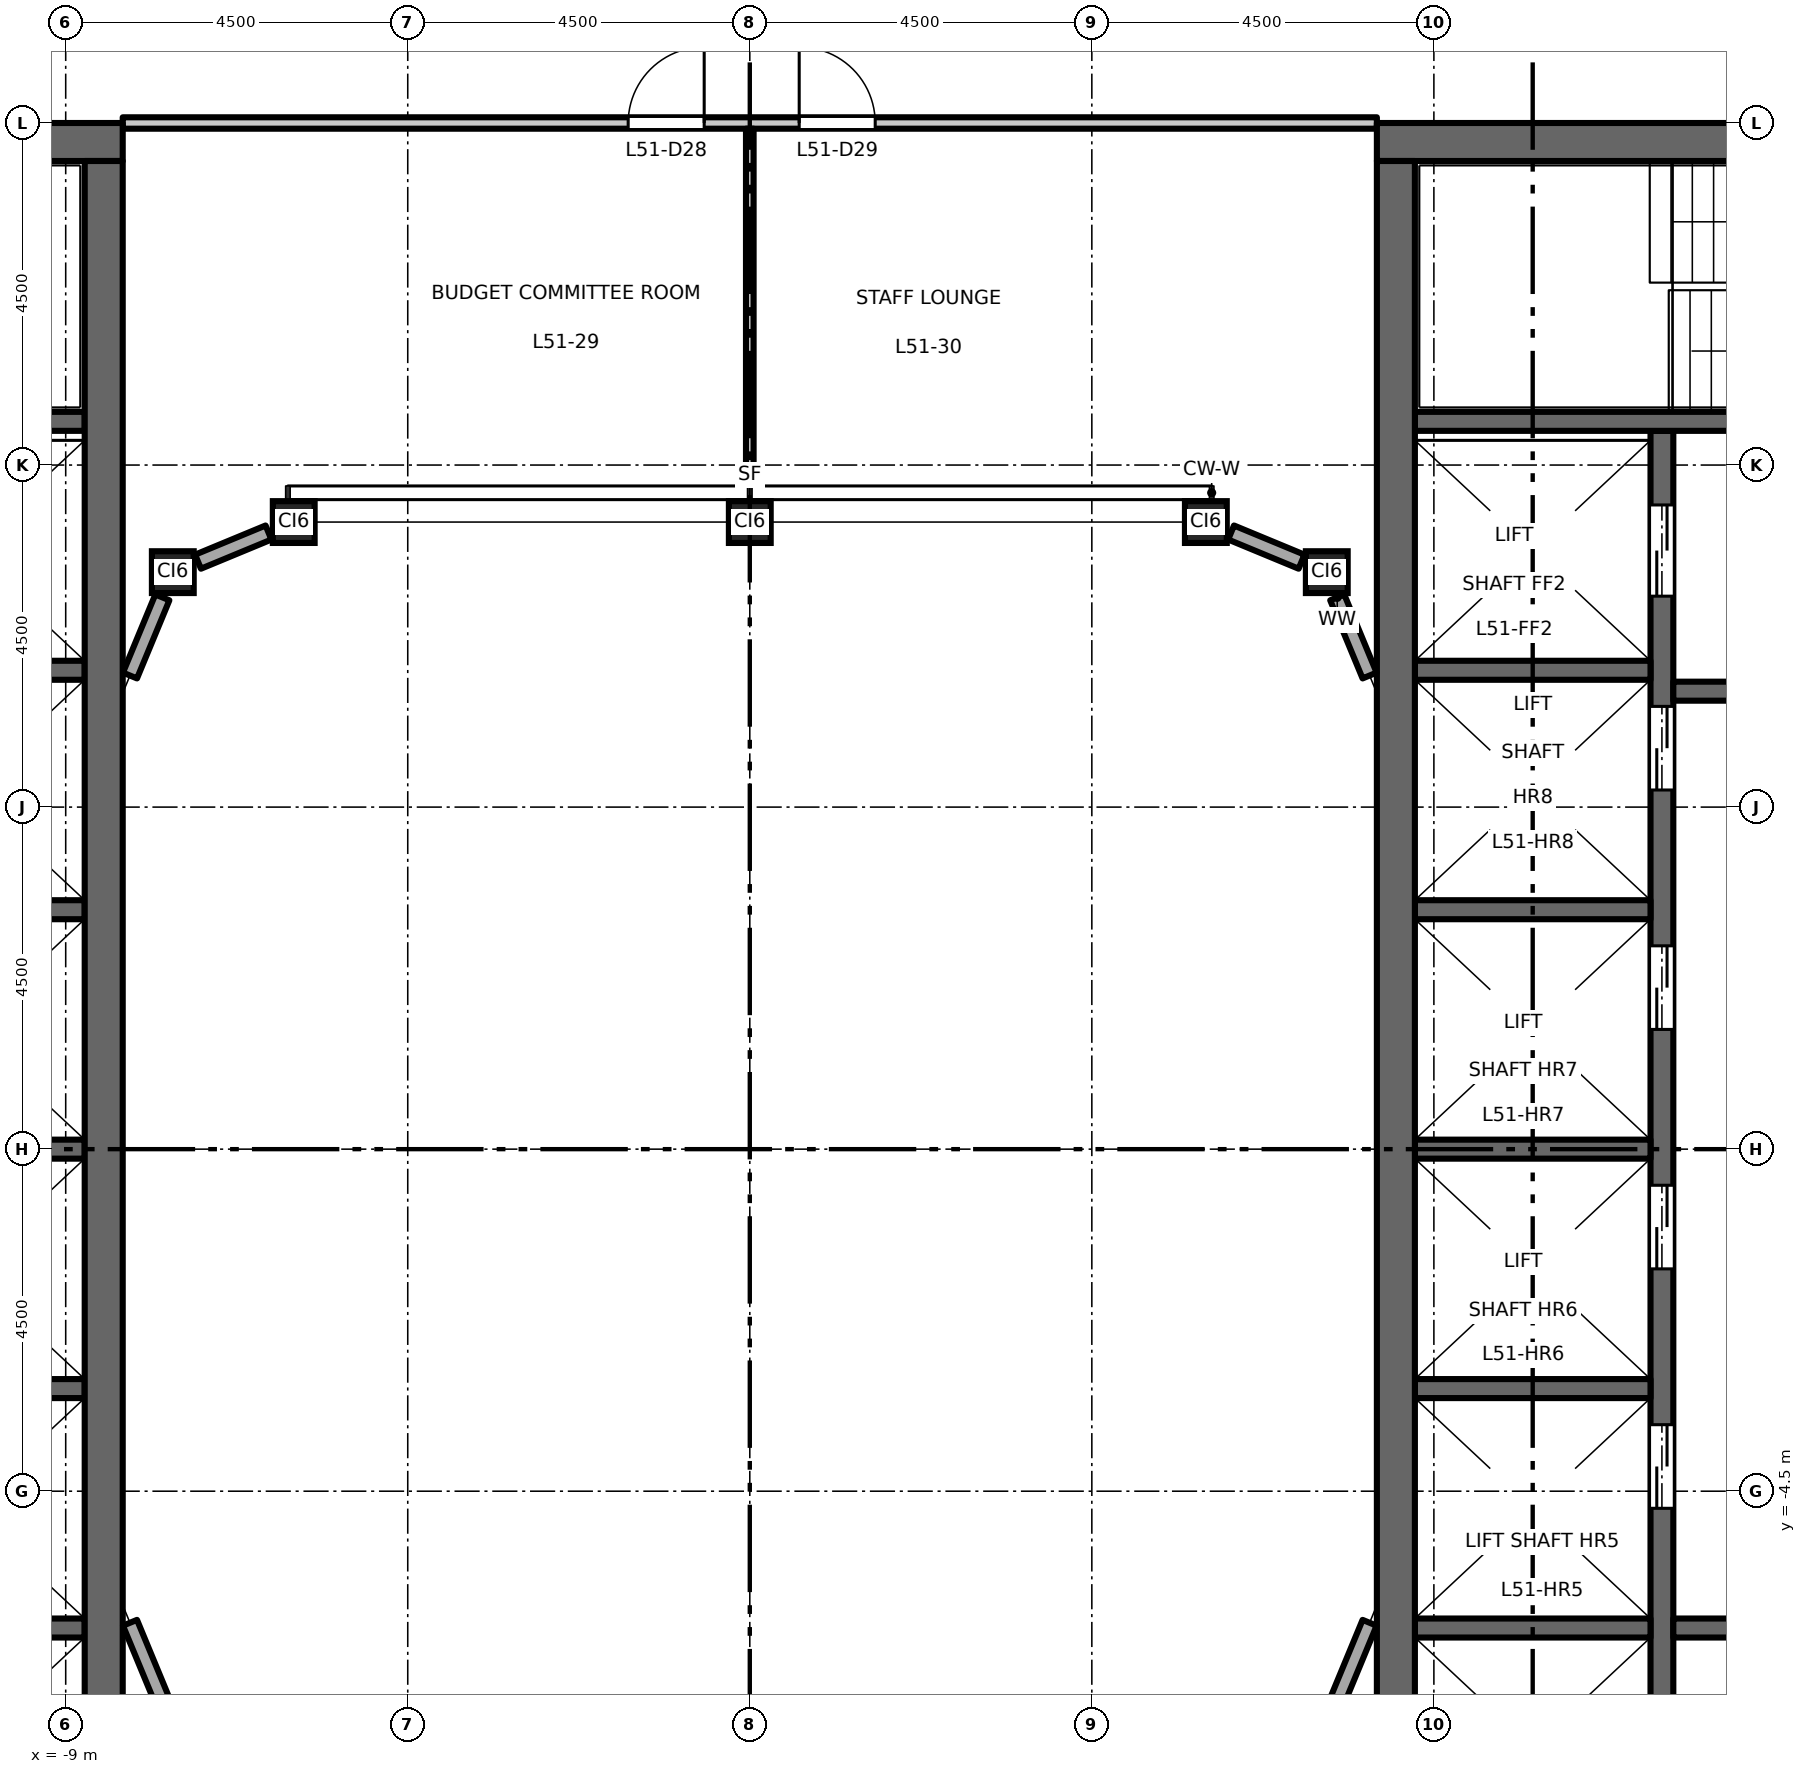
"""IFC4 building model, lengths in metres.
Left out: names, types, materials, properties, quantities, classifications, styles, units other than length and angle.
Written with IfcOpenShell. Run it as: python <this file> out.ifc"""

import sys

from ifc_helpers import new_model, si_unit, direction, frame, frame_2d, origin, origin_2d, place, context, subcontext, project, spatial, rectangle, hollow_rectangle, extrude, element, fill, save


model = new_model("IFC4")
c1 = context("Model", 3, precision=1e-05, world=origin(), true_north=direction((0.0, 1.0)))
c2 = subcontext(c1, "Body", "Model", "MODEL_VIEW")
j1 = project(units=[si_unit("LENGTHUNIT", "METRE"), si_unit("PLANEANGLEUNIT", "RADIAN")], contexts=[c1])
p1 = place(None, origin())
s1 = spatial("IfcSite", under=j1, at=p1, CompositionType="ELEMENT")
p2 = place(p1, origin())
s2 = spatial("IfcBuilding", under=s1, at=p2, CompositionType="ELEMENT")
p3 = place(p2, frame((0.0, 0.0, 237.7)))
s3 = spatial("IfcBuildingStorey", under=s2, at=p3, CompositionType="ELEMENT", Elevation=237.7)
for number, where, z_axis, x_axis in (
    (1, (-7.591, 7.591, 0.0), (0.0, 0.0, 1.0), (1.0, 0.0, 0.0)),
    (2, (-6.0, 8.25, 0.0), (0.0, 0.0, 1.0), (1.0, 0.0, 0.0)),
    (3, (0.0, 8.25, 0.0), (0.0, 0.0, 1.0), (1.0, 0.0, 0.0)),
    (4, (6.0, 8.25, 0.0), (0.0, 0.0, 1.0), (1.0, 0.0, 0.0)),
    (5, (7.591, 7.591, 0.0), (0.0, 0.0, 1.0), (1.0, 0.0, 0.0)),
):
    element("IfcColumn", number, at=place(p3, frame(where, z_axis=z_axis, x_axis=x_axis)), inside=s3, PredefinedType="COLUMN", context=c2, shape_type="SweptSolid", body=[
        extrude(hollow_rectangle(XDim=0.55, YDim=0.55, WallThickness=0.028, at=origin_2d()), origin(), (0.0, 0.0, 1.0), 4.5),
    ])
for number, where, z_axis, x_axis in (
    (6, (-8.75, 0.0, 0.0), (0.0, 0.0, 1.0), (-1.0, 0.0, 0.0)),
    (7, (-8.75, 3.15, 0.0), (0.0, 0.0, 1.0), (-1.0, 0.0, 0.0)),
    (8, (-8.75, 6.3, 0.0), (0.0, 0.0, 1.0), (-1.0, 0.0, 0.0)),
    (9, (-8.75, -3.15, 0.0), (0.0, 0.0, 1.0), (-1.0, 0.0, 0.0)),
    (10, (-8.75, -6.3, 0.0), (0.0, 0.0, 1.0), (-1.0, 0.0, 0.0)),
):
    element("IfcWall", number, at=place(p3, frame(where, z_axis=z_axis, x_axis=x_axis)), inside=s3, PredefinedType="SHEAR", context=c2, shape_type="SweptSolid", body=[
        extrude(rectangle(XDim=3.1, YDim=0.25, at=frame_2d((1.55, 0.0))), origin(), (0.0, 0.0, 1.0), 4.35),
    ])
p4 = place(p3, frame((-8.75, 9.575, 0.0), z_axis=(0.0, 0.0, 1.0), x_axis=(-1.0, 0.0, 0.0)))
e11 = element("IfcWall", 11, at=p4, inside=s3, PredefinedType="SHEAR", context=c2, shape_type="SweptSolid", body=[
    extrude(rectangle(XDim=8.0, YDim=0.25, at=frame_2d((4.0, 0.0))), origin(), (0.0, 0.0, 1.0), 4.35),
])
p5 = place(p4, frame((6.65, 0.0, 0.0)))
e12 = element("IfcOpeningElement", 12, at=p5, cuts=e11, PredefinedType="OPENING", context=c2, shape_type="SweptSolid", body=[
    extrude(rectangle(XDim=1.1, YDim=2.1, at=frame_2d((0.55, 1.05))), frame((0.0, 0.135, 0.0), z_axis=(0.0, -1.0, 0.0), x_axis=(1.0, 0.0, 0.0)), (0.0, 0.0, 1.0), 0.27),
])
p6 = place(p3, frame((-8.25, 13.25, 0.0), z_axis=(0.0, 0.0, 1.0), x_axis=(-1.0, 0.0, 0.0)))
e13 = element("IfcWall", 13, at=p6, inside=s3, PredefinedType="SHEAR", context=c2, shape_type="SweptSolid", body=[
    extrude(rectangle(XDim=13.5, YDim=0.5, at=frame_2d((6.75, 0.0))), origin(), (0.0, 0.0, 1.0), 4.35),
])
p7 = place(p3, frame((-8.5, -13.0, 0.0), z_axis=(0.0, 0.0, 1.0), x_axis=(0.0, 1.0, 0.0)))
e14 = element("IfcWall", 14, at=p7, inside=s3, PredefinedType="SHEAR", context=c2, shape_type="SweptSolid", body=[
    extrude(rectangle(XDim=26.0, YDim=0.5, at=frame_2d((13.0, 0.0))), origin(), (0.0, 0.0, 1.0), 4.35),
])
p8 = place(p3, frame((12.0, -9.45, 0.0), z_axis=(0.0, 0.0, 1.0), x_axis=(0.0, 1.0, 0.0)))
e15 = element("IfcWall", 15, at=p8, inside=s3, PredefinedType="SHEAR", context=c2, shape_type="SweptSolid", body=[
    extrude(rectangle(XDim=18.9, YDim=0.3, at=frame_2d((9.45, 0.0))), origin(), (0.0, 0.0, 1.0), 4.35),
])
p9 = place(p8, frame((4.725, 0.0, 0.0)))
e16 = element("IfcOpeningElement", 16, at=p9, cuts=e15, PredefinedType="OPENING", context=c2, shape_type="SweptSolid", body=[
    extrude(rectangle(XDim=1.1, YDim=2.1, at=frame_2d((0.55, 1.05))), frame((0.0, 0.16, 0.0), z_axis=(0.0, -1.0, 0.0), x_axis=(1.0, 0.0, 0.0)), (0.0, 0.0, 1.0), 0.32),
])
p10 = place(p8, frame((7.875, 0.0, 0.0)))
e17 = element("IfcOpeningElement", 17, at=p10, cuts=e15, PredefinedType="OPENING", context=c2, shape_type="SweptSolid", body=[
    extrude(rectangle(XDim=1.1, YDim=2.1, at=frame_2d((0.55, 1.05))), frame((0.0, 0.16, 0.0), z_axis=(0.0, -1.0, 0.0), x_axis=(1.0, 0.0, 0.0)), (0.0, 0.0, 1.0), 0.32),
])
p11 = place(p8, frame((11.025, 0.0, 0.0)))
e18 = element("IfcOpeningElement", 18, at=p11, cuts=e15, PredefinedType="OPENING", context=c2, shape_type="SweptSolid", body=[
    extrude(rectangle(XDim=1.1, YDim=2.1, at=frame_2d((0.55, 1.05))), frame((0.0, 0.16, 0.0), z_axis=(0.0, -1.0, 0.0), x_axis=(1.0, 0.0, 0.0)), (0.0, 0.0, 1.0), 0.32),
])
p12 = place(p8, frame((14.175, 0.0, 0.0)))
e19 = element("IfcOpeningElement", 19, at=p12, cuts=e15, PredefinedType="OPENING", context=c2, shape_type="SweptSolid", body=[
    extrude(rectangle(XDim=1.1, YDim=2.1, at=frame_2d((0.55, 1.05))), frame((0.0, 0.16, 0.0), z_axis=(0.0, -1.0, 0.0), x_axis=(1.0, 0.0, 0.0)), (0.0, 0.0, 1.0), 0.32),
])
p13 = place(p8, frame((16.725, 0.0, 0.0)))
e20 = element("IfcOpeningElement", 20, at=p13, cuts=e15, PredefinedType="OPENING", context=c2, shape_type="SweptSolid", body=[
    extrude(rectangle(XDim=1.2, YDim=2.1, at=frame_2d((0.6, 1.05))), frame((0.0, 0.16, 0.0), z_axis=(0.0, -1.0, 0.0), x_axis=(1.0, 0.0, 0.0)), (0.0, 0.0, 1.0), 0.32),
])
p14 = place(p8, frame((0.975, 0.0, 0.0)))
e21 = element("IfcOpeningElement", 21, at=p14, cuts=e15, PredefinedType="OPENING", context=c2, shape_type="SweptSolid", body=[
    extrude(rectangle(XDim=1.2, YDim=2.1, at=frame_2d((0.6, 1.05))), frame((0.0, 0.16, 0.0), z_axis=(0.0, -1.0, 0.0), x_axis=(1.0, 0.0, 0.0)), (0.0, 0.0, 1.0), 0.32),
])
p15 = place(p3, frame((12.15, 6.025, 0.0), z_axis=(0.0, 0.0, 1.0), x_axis=(1.0, 0.0, 0.0)))
e22 = element("IfcWall", 22, at=p15, inside=s3, PredefinedType="SHEAR", context=c2, shape_type="SweptSolid", body=[
    extrude(rectangle(XDim=4.6, YDim=0.25, at=frame_2d((2.3, 0.0))), origin(), (0.0, 0.0, 1.0), 4.35),
])
p16 = place(p15, frame((1.8, 0.0, 0.0)))
e23 = element("IfcOpeningElement", 23, at=p16, cuts=e22, PredefinedType="OPENING", context=c2, shape_type="SweptSolid", body=[
    extrude(rectangle(XDim=1.0, YDim=2.1, at=frame_2d((0.5, 1.05))), frame((0.0, 0.135, 0.0), z_axis=(0.0, -1.0, 0.0), x_axis=(1.0, 0.0, 0.0)), (0.0, 0.0, 1.0), 0.27),
])
p17 = place(p3, frame((12.15, -6.3, 0.0), z_axis=(0.0, 0.0, 1.0), x_axis=(1.0, 0.0, 0.0)))
e24 = element("IfcWall", 24, at=p17, inside=s3, PredefinedType="SHEAR", context=c2, shape_type="SweptSolid", body=[
    extrude(rectangle(XDim=9.1, YDim=0.25, at=frame_2d((4.55, 0.0))), origin(), (0.0, 0.0, 1.0), 4.35),
])
p18 = place(p17, frame((1.8, 0.0, 0.0)))
e25 = element("IfcOpeningElement", 25, at=p18, cuts=e24, PredefinedType="OPENING", context=c2, shape_type="SweptSolid", body=[
    extrude(rectangle(XDim=1.0, YDim=2.1, at=frame_2d((0.5, 1.05))), frame((0.0, 0.135, 0.0), z_axis=(0.0, -1.0, 0.0), x_axis=(1.0, 0.0, 0.0)), (0.0, 0.0, 1.0), 0.27),
])
for number, where, z_axis, x_axis in (
    (26, (8.75, 0.0, 0.0), (0.0, 0.0, 1.0), (1.0, 0.0, 0.0)),
    (27, (8.75, 3.15, 0.0), (0.0, 0.0, 1.0), (1.0, 0.0, 0.0)),
    (28, (8.75, 6.3, 0.0), (0.0, 0.0, 1.0), (1.0, 0.0, 0.0)),
    (29, (8.75, -3.15, 0.0), (0.0, 0.0, 1.0), (1.0, 0.0, 0.0)),
    (30, (8.75, -6.3, 0.0), (0.0, 0.0, 1.0), (1.0, 0.0, 0.0)),
):
    element("IfcWall", number, at=place(p3, frame(where, z_axis=z_axis, x_axis=x_axis)), inside=s3, PredefinedType="SHEAR", context=c2, shape_type="SweptSolid", body=[
        extrude(rectangle(XDim=3.1, YDim=0.25, at=frame_2d((1.55, 0.0))), origin(), (0.0, 0.0, 1.0), 4.35),
    ])
p19 = place(p3, frame((8.75, 9.575, 0.0), z_axis=(0.0, 0.0, 1.0), x_axis=(1.0, 0.0, 0.0)))
e31 = element("IfcWall", 31, at=p19, inside=s3, PredefinedType="SHEAR", context=c2, shape_type="SweptSolid", body=[
    extrude(rectangle(XDim=8.0, YDim=0.25, at=frame_2d((4.0, 0.0))), origin(), (0.0, 0.0, 1.0), 4.35),
])
p20 = place(p19, frame((6.65, 0.0, 0.0)))
e32 = element("IfcOpeningElement", 32, at=p20, cuts=e31, PredefinedType="OPENING", context=c2, shape_type="SweptSolid", body=[
    extrude(rectangle(XDim=1.1, YDim=2.1, at=frame_2d((0.55, 1.05))), frame((0.0, 0.135, 0.0), z_axis=(0.0, -1.0, 0.0), x_axis=(1.0, 0.0, 0.0)), (0.0, 0.0, 1.0), 0.27),
])
p21 = place(p3, frame((8.25, 13.25, 0.0), z_axis=(0.0, 0.0, 1.0), x_axis=(1.0, 0.0, 0.0)))
e33 = element("IfcWall", 33, at=p21, inside=s3, PredefinedType="SHEAR", context=c2, shape_type="SweptSolid", body=[
    extrude(rectangle(XDim=13.5, YDim=0.5, at=frame_2d((6.75, 0.0))), origin(), (0.0, 0.0, 1.0), 4.35),
])
p22 = place(p3, frame((8.5, -13.0, 0.0), z_axis=(0.0, 0.0, 1.0), x_axis=(0.0, 1.0, 0.0)))
e34 = element("IfcWall", 34, at=p22, inside=s3, PredefinedType="SHEAR", context=c2, shape_type="SweptSolid", body=[
    extrude(rectangle(XDim=26.0, YDim=0.5, at=frame_2d((13.0, 0.0))), origin(), (0.0, 0.0, 1.0), 4.35),
])
for number, where, z_axis, x_axis in (
    (35, (7.729, -7.259, 0.0), (0.0, 0.0, 1.0), (0.383, 0.924, 0.0)),
    (36, (8.154, 6.231, 0.0), (0.0, 0.0, 1.0), (-0.383, 0.924, 0.0)),
):
    element("IfcWall", number, at=place(p3, frame(where, z_axis=z_axis, x_axis=x_axis)), inside=s3, PredefinedType="STANDARD", context=c2, shape_type="SweptSolid", body=[
        extrude(rectangle(XDim=1.113, YDim=0.2, at=frame_2d((0.556, 0.0))), origin(), (0.0, 0.0, 1.0), 3.918),
    ])
for number, where, z_axis, x_axis in (
    (37, (7.259, 7.729, 0.0), (0.0, 0.0, 1.0), (-0.924, 0.383, 0.0)),
    (38, (-6.332, 8.113, 0.0), (0.0, 0.0, 1.0), (-0.924, -0.383, 0.0)),
):
    element("IfcWall", number, at=place(p3, frame(where, z_axis=z_axis, x_axis=x_axis)), inside=s3, PredefinedType="STANDARD", context=c2, shape_type="SweptSolid", body=[
        extrude(rectangle(XDim=1.003, YDim=0.2, at=frame_2d((0.502, 0.0))), origin(), (0.0, 0.0, 1.0), 3.918),
    ])
for number, where, z_axis, x_axis in (
    (39, (-7.729, 7.259, 0.0), (0.0, 0.0, 1.0), (-0.383, -0.924, 0.0)),
    (40, (-8.154, -6.231, 0.0), (0.0, 0.0, 1.0), (0.383, -0.924, 0.0)),
):
    element("IfcWall", number, at=place(p3, frame(where, z_axis=z_axis, x_axis=x_axis)), inside=s3, PredefinedType="STANDARD", context=c2, shape_type="SweptSolid", body=[
        extrude(rectangle(XDim=1.113, YDim=0.2, at=frame_2d((0.556, 0.0))), origin(), (0.0, 0.0, 1.0), 3.918),
    ])
p23 = place(p3, frame((-8.25, 13.5, 0.0), z_axis=(0.0, 0.0, 1.0), x_axis=(1.0, 0.0, 0.0)))
e41 = element("IfcWall", 41, at=p23, inside=s3, PredefinedType="PARTITIONING", context=c2, shape_type="SweptSolid", body=[
    extrude(rectangle(XDim=16.5, YDim=0.15, at=frame_2d((8.25, 0.0))), origin(), (0.0, 0.0, 1.0), 4.35),
])
p24 = place(p23, frame((6.65, 0.0, 0.0)))
e42 = element("IfcOpeningElement", 42, at=p24, cuts=e41, PredefinedType="OPENING", context=c2, shape_type="SweptSolid", body=[
    extrude(rectangle(XDim=1.0, YDim=2.1, at=frame_2d((0.5, 1.05))), frame((0.0, 0.085, 0.0), z_axis=(0.0, -1.0, 0.0), x_axis=(1.0, 0.0, 0.0)), (0.0, 0.0, 1.0), 0.17),
])
p25 = place(p23, frame((8.9, 0.0, 0.0)))
e43 = element("IfcOpeningElement", 43, at=p25, cuts=e41, PredefinedType="OPENING", context=c2, shape_type="SweptSolid", body=[
    extrude(rectangle(XDim=1.0, YDim=2.1, at=frame_2d((0.5, 1.05))), frame((0.0, 0.085, 0.0), z_axis=(0.0, -1.0, 0.0), x_axis=(1.0, 0.0, 0.0)), (0.0, 0.0, 1.0), 0.17),
])
p26 = place(p3, frame((0.0, 8.6, 0.0), z_axis=(0.0, 0.0, 1.0), x_axis=(0.0, 1.0, 0.0)))
e44 = element("IfcWall", 44, at=p26, inside=s3, PredefinedType="PARTITIONING", context=c2, shape_type="SweptSolid", body=[
    extrude(rectangle(XDim=4.825, YDim=0.1, at=frame_2d((2.413, 0.0))), origin(), (0.0, 0.0, 1.0), 3.55),
])
p27 = place(p9, origin())
e45 = element("IfcDoor", 45, at=p27, inside=s3, OperationType="DOUBLE_DOOR_SLIDING", PredefinedType="DOOR", context=c2, shape_type="SweptSolid", body=[
    extrude(rectangle(XDim=1.1, YDim=2.1, at=frame_2d((0.55, 1.05))), frame((0.0, 0.025, 0.0), z_axis=(0.0, -1.0, 0.0), x_axis=(1.0, 0.0, 0.0)), (0.0, 0.0, 1.0), 0.05),
])
fill(e16, e45)
p28 = place(p10, origin())
e46 = element("IfcDoor", 46, at=p28, inside=s3, OperationType="DOUBLE_DOOR_SLIDING", PredefinedType="DOOR", context=c2, shape_type="SweptSolid", body=[
    extrude(rectangle(XDim=1.1, YDim=2.1, at=frame_2d((0.55, 1.05))), frame((0.0, 0.025, 0.0), z_axis=(0.0, -1.0, 0.0), x_axis=(1.0, 0.0, 0.0)), (0.0, 0.0, 1.0), 0.05),
])
fill(e17, e46)
p29 = place(p11, origin())
e47 = element("IfcDoor", 47, at=p29, inside=s3, OperationType="DOUBLE_DOOR_SLIDING", PredefinedType="DOOR", context=c2, shape_type="SweptSolid", body=[
    extrude(rectangle(XDim=1.1, YDim=2.1, at=frame_2d((0.55, 1.05))), frame((0.0, 0.025, 0.0), z_axis=(0.0, -1.0, 0.0), x_axis=(1.0, 0.0, 0.0)), (0.0, 0.0, 1.0), 0.05),
])
fill(e18, e47)
p30 = place(p12, origin())
e48 = element("IfcDoor", 48, at=p30, inside=s3, OperationType="DOUBLE_DOOR_SLIDING", PredefinedType="DOOR", context=c2, shape_type="SweptSolid", body=[
    extrude(rectangle(XDim=1.1, YDim=2.1, at=frame_2d((0.55, 1.05))), frame((0.0, 0.025, 0.0), z_axis=(0.0, -1.0, 0.0), x_axis=(1.0, 0.0, 0.0)), (0.0, 0.0, 1.0), 0.05),
])
fill(e19, e48)
p31 = place(p13, origin())
e49 = element("IfcDoor", 49, at=p31, inside=s3, OperationType="DOUBLE_DOOR_SLIDING", PredefinedType="DOOR", context=c2, shape_type="SweptSolid", body=[
    extrude(rectangle(XDim=1.2, YDim=2.1, at=frame_2d((0.6, 1.05))), frame((0.0, 0.025, 0.0), z_axis=(0.0, -1.0, 0.0), x_axis=(1.0, 0.0, 0.0)), (0.0, 0.0, 1.0), 0.05),
])
fill(e20, e49)
p32 = place(p24, origin())
e50 = element("IfcDoor", 50, at=p32, inside=s3, OperationType="SINGLE_SWING_RIGHT", PredefinedType="DOOR", context=c2, shape_type="SweptSolid", body=[
    extrude(rectangle(XDim=1.0, YDim=2.1, at=frame_2d((0.5, 1.05))), frame((0.0, 0.025, 0.0), z_axis=(0.0, -1.0, 0.0), x_axis=(1.0, 0.0, 0.0)), (0.0, 0.0, 1.0), 0.05),
])
fill(e42, e50)
p33 = place(p25, origin())
e51 = element("IfcDoor", 51, at=p33, inside=s3, OperationType="SINGLE_SWING_LEFT", PredefinedType="DOOR", context=c2, shape_type="SweptSolid", body=[
    extrude(rectangle(XDim=1.0, YDim=2.1, at=frame_2d((0.5, 1.05))), frame((0.0, 0.025, 0.0), z_axis=(0.0, -1.0, 0.0), x_axis=(1.0, 0.0, 0.0)), (0.0, 0.0, 1.0), 0.05),
])
fill(e43, e51)
save(model, sys.argv[1])
